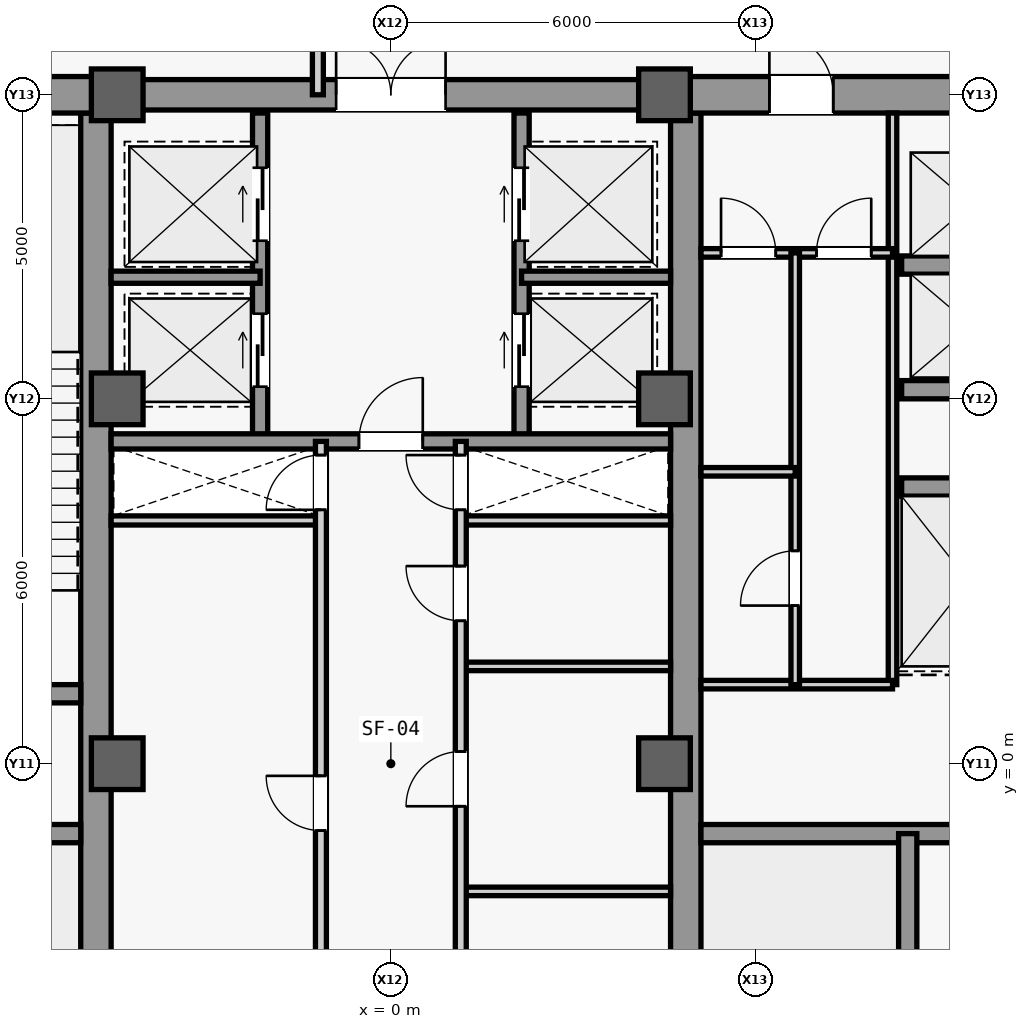
"""IFC4 building model, lengths in metres.
Left out: names, types, materials, properties, quantities, classifications, styles, units other than length and angle.
Written with IfcOpenShell. Run it as: python <this file> out.ifc"""

import sys

from ifc_helpers import new_model, si_unit, direction, frame, frame_2d, origin, origin_2d, place, context, subcontext, project, spatial, rectangle, extrude, source, transform, mapped, element, fill, save


model = new_model("IFC4")
c1 = context("Model", 3, precision=1e-05, world=origin(), true_north=direction((0.0, 1.0)))
c2 = subcontext(c1, "Body", "Model", "MODEL_VIEW")
j1 = project(units=[si_unit("LENGTHUNIT", "METRE"), si_unit("PLANEANGLEUNIT", "RADIAN")], contexts=[c1])
p1 = place(None, origin())
s1 = spatial("IfcSite", under=j1, at=p1, CompositionType="ELEMENT")
p2 = place(p1, origin())
s2 = spatial("IfcBuilding", under=s1, at=p2, CompositionType="ELEMENT")
p3 = place(p2, frame((0.0, 0.0, 263.1)))
s3 = spatial("IfcBuildingStorey", under=s2, at=p3, CompositionType="ELEMENT", Elevation=263.1)
m1 = source(origin(), c2, "Body", "SweptSolid", [
    extrude(rectangle(XDim=21.4, YDim=0.5, at=frame_2d((10.7, 0.0))), origin(), (0.0, 0.0, 1.0), 4.6),
])
for number, where, z_axis, x_axis in (
    (1, (-4.85, -10.7, 0.0), (0.0, 0.0, 1.0), (0.0, 1.0, 0.0)),
    (2, (4.85, -10.7, 0.0), (0.0, 0.0, 1.0), (0.0, 1.0, 0.0)),
):
    element("IfcWall", number, at=place(p3, frame(where, z_axis=z_axis, x_axis=x_axis)), inside=s3, PredefinedType="SHEAR", context=c2, shape_type="MappedRepresentation", body=[
        mapped(m1, transform((0.0, 0.0, 0.0), scale=1.0)),
    ])
m2 = source(origin(), c2, "Body", "SweptSolid", [
    extrude(rectangle(XDim=5.9, YDim=0.6, at=frame_2d((2.95, 0.0))), origin(), (0.0, 0.0, 1.0), 4.6),
])
p4 = place(p3, frame((-10.75, 11.0, 0.0), z_axis=(0.0, 0.0, 1.0), x_axis=(1.0, 0.0, 0.0)))
e3 = element("IfcWall", 3, at=p4, inside=s3, PredefinedType="SHEAR", context=c2, shape_type="MappedRepresentation", body=[
    mapped(m2, transform((0.0, 0.0, 0.0), scale=1.0)),
])
p5 = place(p3, frame((4.85, 11.0, 0.0), z_axis=(0.0, 0.0, 1.0), x_axis=(1.0, 0.0, 0.0)))
e4 = element("IfcWall", 4, at=p5, inside=s3, PredefinedType="SHEAR", context=c2, shape_type="MappedRepresentation", body=[
    mapped(m2, transform((0.0, 0.0, 0.0), scale=1.0)),
])
m3 = source(origin(), c2, "Body", "SweptSolid", [
    extrude(rectangle(XDim=1.05, YDim=2.2, at=frame_2d((0.525, 1.1))), frame((0.0, 0.31, 0.0), z_axis=(0.0, -1.0, 0.0), x_axis=(1.0, 0.0, 0.0)), (0.0, 0.0, 1.0), 0.62),
])
p6 = place(p5, frame((1.375, 0.0, 0.0)))
e5 = element("IfcOpeningElement", 5, at=p6, cuts=e4, PredefinedType="OPENING", context=c2, shape_type="MappedRepresentation", body=[
    mapped(m3, transform((0.0, 0.0, 0.0), scale=1.0)),
])
m4 = source(origin(), c2, "Body", "SweptSolid", [
    extrude(rectangle(XDim=5.65, YDim=0.3, at=frame_2d((2.825, 0.0))), origin(), (0.0, 0.0, 1.0), 4.6),
])
for number, where, z_axis, x_axis in (
    (6, (-10.75, -1.15, 0.0), (0.0, 0.0, 1.0), (1.0, 0.0, 0.0)),
    (7, (-10.75, 1.15, 0.0), (0.0, 0.0, 1.0), (1.0, 0.0, 0.0)),
    (8, (5.1, -1.15, 0.0), (0.0, 0.0, 1.0), (1.0, 0.0, 0.0)),
):
    element("IfcWall", number, at=place(p3, frame(where, z_axis=z_axis, x_axis=x_axis)), inside=s3, PredefinedType="SHEAR", context=c2, shape_type="MappedRepresentation", body=[
        mapped(m4, transform((0.0, 0.0, 0.0), scale=1.0)),
    ])
m5 = source(origin(), c2, "Body", "SweptSolid", [
    extrude(rectangle(XDim=9.2, YDim=0.5, at=frame_2d((4.6, 0.0))), origin(), (0.0, 0.0, 1.0), 4.6),
])
p7 = place(p3, frame((-4.6, 11.0, 0.0), z_axis=(0.0, 0.0, 1.0), x_axis=(1.0, 0.0, 0.0)))
e9 = element("IfcWall", 9, at=p7, inside=s3, PredefinedType="SHEAR", context=c2, shape_type="MappedRepresentation", body=[
    mapped(m5, transform((0.0, 0.0, 0.0), scale=1.0)),
])
m6 = source(origin(), c2, "Body", "SweptSolid", [
    extrude(rectangle(XDim=1.8, YDim=2.25, at=frame_2d((0.9, 1.125))), frame((0.0, 0.26, 0.0), z_axis=(0.0, -1.0, 0.0), x_axis=(1.0, 0.0, 0.0)), (0.0, 0.0, 1.0), 0.52),
])
p8 = place(p7, frame((3.7, 0.0, 0.0)))
e10 = element("IfcOpeningElement", 10, at=p8, cuts=e9, PredefinedType="OPENING", context=c2, shape_type="MappedRepresentation", body=[
    mapped(m6, transform((0.0, 0.0, 0.0), scale=1.0)),
])
m7 = source(origin(), c2, "Body", "SweptSolid", [
    extrude(rectangle(XDim=0.85, YDim=0.85, at=origin_2d()), origin(), (0.0, 0.0, 1.0), 5.2),
])
for number, where, z_axis, x_axis in (
    (11, (-4.5, 0.0, 0.0), (0.0, 0.0, 1.0), (1.0, 0.0, 0.0)),
    (12, (-4.5, 6.0, 0.0), (0.0, 0.0, 1.0), (1.0, 0.0, 0.0)),
    (13, (-4.5, 11.0, 0.0), (0.0, 0.0, 1.0), (1.0, 0.0, 0.0)),
    (14, (4.5, 0.0, 0.0), (0.0, 0.0, 1.0), (1.0, 0.0, 0.0)),
    (15, (4.5, 6.0, 0.0), (0.0, 0.0, 1.0), (1.0, 0.0, 0.0)),
    (16, (4.5, 11.0, 0.0), (0.0, 0.0, 1.0), (1.0, 0.0, 0.0)),
):
    element("IfcColumn", number, at=place(p3, frame(where, z_axis=z_axis, x_axis=x_axis)), inside=s3, PredefinedType="COLUMN", context=c2, shape_type="MappedRepresentation", body=[
        mapped(m7, transform((0.0, 0.0, 0.0), scale=1.0)),
    ])
m8 = source(origin(), c2, "Body", "SweptSolid", [
    extrude(rectangle(XDim=7.8, YDim=0.3, at=frame_2d((3.9, 0.0))), origin(), (0.0, 0.0, 1.0), 4.6),
])
p9 = place(p3, frame((8.5, -8.95, 0.0), z_axis=(0.0, 0.0, 1.0), x_axis=(0.0, 1.0, 0.0)))
e17 = element("IfcWall", 17, at=p9, inside=s3, PredefinedType="SHEAR", context=c2, shape_type="MappedRepresentation", body=[
    mapped(m8, transform((0.0, 0.0, 0.0), scale=1.0)),
])
m9 = source(origin(), c2, "Body", "SweptSolid", [
    extrude(rectangle(XDim=2.3, YDim=0.3, at=frame_2d((1.15, 0.0))), origin(), (0.0, 0.0, 1.0), 4.6),
])
for number, where, z_axis, x_axis in (
    (18, (8.4, 4.55, 0.0), (0.0, 0.0, 1.0), (1.0, 0.0, 0.0)),
    (19, (8.4, 6.15, 0.0), (0.0, 0.0, 1.0), (1.0, 0.0, 0.0)),
    (20, (8.4, 8.2, 0.0), (0.0, 0.0, 1.0), (1.0, 0.0, 0.0)),
):
    element("IfcWall", number, at=place(p3, frame(where, z_axis=z_axis, x_axis=x_axis)), inside=s3, PredefinedType="SHEAR", context=c2, shape_type="MappedRepresentation", body=[
        mapped(m9, transform((0.0, 0.0, 0.0), scale=1.0)),
    ])
m10 = source(origin(), c2, "Body", "SweptSolid", [
    extrude(rectangle(XDim=9.4, YDim=0.14, at=frame_2d((4.7, 0.0))), origin(), (0.0, 0.0, 1.0), 4.6),
])
p10 = place(p3, frame((8.25, 1.3, 0.0), z_axis=(0.0, 0.0, 1.0), x_axis=(0.0, 1.0, 0.0)))
e21 = element("IfcWall", 21, at=p10, inside=s3, PredefinedType="PARTITIONING", context=c2, shape_type="MappedRepresentation", body=[
    mapped(m10, transform((0.0, 0.0, 0.0), scale=1.0)),
])
m11 = source(origin(), c2, "Body", "SweptSolid", [
    extrude(rectangle(XDim=3.15, YDim=0.14, at=frame_2d((1.575, 0.0))), origin(), (0.0, 0.0, 1.0), 4.6),
])
p11 = place(p3, frame((5.1, 1.3, 0.0), z_axis=(0.0, 0.0, 1.0), x_axis=(1.0, 0.0, 0.0)))
e22 = element("IfcWall", 22, at=p11, inside=s3, PredefinedType="PARTITIONING", context=c2, shape_type="MappedRepresentation", body=[
    mapped(m11, transform((0.0, 0.0, 0.0), scale=1.0)),
])
p12 = place(p3, frame((5.1, 8.4, 0.0), z_axis=(0.0, 0.0, 1.0), x_axis=(1.0, 0.0, 0.0)))
e23 = element("IfcWall", 23, at=p12, inside=s3, PredefinedType="PARTITIONING", context=c2, shape_type="MappedRepresentation", body=[
    mapped(m11, transform((0.0, 0.0, 0.0), scale=1.0)),
])
m12 = source(origin(), c2, "Body", "SweptSolid", [
    extrude(rectangle(XDim=0.9, YDim=2.15, at=frame_2d((0.45, 1.075))), frame((0.0, 0.08, 0.0), z_axis=(0.0, -1.0, 0.0), x_axis=(1.0, 0.0, 0.0)), (0.0, 0.0, 1.0), 0.16),
])
p13 = place(p12, frame((0.33, 0.0, 0.0)))
e24 = element("IfcOpeningElement", 24, at=p13, cuts=e23, PredefinedType="OPENING", context=c2, shape_type="MappedRepresentation", body=[
    mapped(m12, transform((0.0, 0.0, 0.0), scale=1.0)),
])
p14 = place(p12, frame((1.9, 0.0, 0.0)))
e25 = element("IfcOpeningElement", 25, at=p14, cuts=e23, PredefinedType="OPENING", context=c2, shape_type="MappedRepresentation", body=[
    mapped(m12, transform((0.0, 0.0, 0.0), scale=1.0)),
])
m13 = source(origin(), c2, "Body", "SweptSolid", [
    extrude(rectangle(XDim=7.1, YDim=0.14, at=frame_2d((3.55, 0.0))), origin(), (0.0, 0.0, 1.0), 4.6),
])
p15 = place(p3, frame((6.65, 1.3, 0.0), z_axis=(0.0, 0.0, 1.0), x_axis=(0.0, 1.0, 0.0)))
e26 = element("IfcWall", 26, at=p15, inside=s3, PredefinedType="PARTITIONING", context=c2, shape_type="MappedRepresentation", body=[
    mapped(m13, transform((0.0, 0.0, 0.0), scale=1.0)),
])
p16 = place(p15, frame((1.3, 0.0, 0.0)))
e27 = element("IfcOpeningElement", 27, at=p16, cuts=e26, PredefinedType="OPENING", context=c2, shape_type="MappedRepresentation", body=[
    mapped(m12, transform((0.0, 0.0, 0.0), scale=1.0)),
])
m14 = source(origin(), c2, "Body", "SweptSolid", [
    extrude(rectangle(XDim=1.55, YDim=0.14, at=frame_2d((0.775, 0.0))), origin(), (0.0, 0.0, 1.0), 4.6),
])
p17 = place(p3, frame((5.1, 4.8, 0.0), z_axis=(0.0, 0.0, 1.0), x_axis=(1.0, 0.0, 0.0)))
e28 = element("IfcWall", 28, at=p17, inside=s3, PredefinedType="PARTITIONING", context=c2, shape_type="MappedRepresentation", body=[
    mapped(m14, transform((0.0, 0.0, 0.0), scale=1.0)),
])
m15 = source(origin(), c2, "Body", "SweptSolid", [
    extrude(rectangle(XDim=3.45, YDim=0.15, at=frame_2d((1.725, 0.0))), origin(), (0.0, 0.0, 1.0), 4.6),
])
for number, where, z_axis, x_axis in (
    (29, (-4.6, 4.0, 0.0), (0.0, 0.0, 1.0), (1.0, 0.0, 0.0)),
    (30, (1.15, 4.0, 0.0), (0.0, 0.0, 1.0), (1.0, 0.0, 0.0)),
):
    element("IfcWall", number, at=place(p3, frame(where, z_axis=z_axis, x_axis=x_axis)), inside=s3, PredefinedType="PARTITIONING", context=c2, shape_type="MappedRepresentation", body=[
        mapped(m15, transform((0.0, 0.0, 0.0), scale=1.0)),
    ])
m16 = source(origin(), c2, "Body", "SweptSolid", [
    extrude(rectangle(XDim=5.4, YDim=0.25, at=frame_2d((2.7, 0.0))), origin(), (0.0, 0.0, 1.0), 4.6),
])
p18 = place(p3, frame((-2.15, 5.3, 0.0), z_axis=(0.0, 0.0, 1.0), x_axis=(0.0, 1.0, 0.0)))
e31 = element("IfcWall", 31, at=p18, inside=s3, PredefinedType="SHEAR", context=c2, shape_type="MappedRepresentation", body=[
    mapped(m16, transform((0.0, 0.0, 0.0), scale=1.0)),
])
m17 = source(origin(), c2, "Body", "SweptSolid", [
    extrude(rectangle(XDim=1.2, YDim=2.3, at=frame_2d((0.6, 1.15))), frame((0.0, 0.135, 0.0), z_axis=(0.0, -1.0, 0.0), x_axis=(1.0, 0.0, 0.0)), (0.0, 0.0, 1.0), 0.27),
])
p19 = place(p18, frame((3.3, 0.0, 0.0)))
e32 = element("IfcOpeningElement", 32, at=p19, cuts=e31, PredefinedType="OPENING", context=c2, shape_type="MappedRepresentation", body=[
    mapped(m17, transform((0.0, 0.0, 0.0), scale=1.0)),
])
p20 = place(p18, frame((0.9, 0.0, 0.0)))
e33 = element("IfcOpeningElement", 33, at=p20, cuts=e31, PredefinedType="OPENING", context=c2, shape_type="MappedRepresentation", body=[
    mapped(m17, transform((0.0, 0.0, 0.0), scale=1.0)),
])
p21 = place(p3, frame((2.15, 5.3, 0.0), z_axis=(0.0, 0.0, 1.0), x_axis=(0.0, 1.0, 0.0)))
e34 = element("IfcWall", 34, at=p21, inside=s3, PredefinedType="SHEAR", context=c2, shape_type="MappedRepresentation", body=[
    mapped(m16, transform((0.0, 0.0, 0.0), scale=1.0)),
])
p22 = place(p21, frame((3.3, 0.0, 0.0)))
e35 = element("IfcOpeningElement", 35, at=p22, cuts=e34, PredefinedType="OPENING", context=c2, shape_type="MappedRepresentation", body=[
    mapped(m17, transform((0.0, 0.0, 0.0), scale=1.0)),
])
p23 = place(p21, frame((0.9, 0.0, 0.0)))
e36 = element("IfcOpeningElement", 36, at=p23, cuts=e34, PredefinedType="OPENING", context=c2, shape_type="MappedRepresentation", body=[
    mapped(m17, transform((0.0, 0.0, 0.0), scale=1.0)),
])
m18 = source(origin(), c2, "Body", "SweptSolid", [
    extrude(rectangle(XDim=2.45, YDim=0.2, at=frame_2d((1.225, 0.0))), origin(), (0.0, 0.0, 1.0), 4.6),
])
for number, where, z_axis, x_axis in (
    (37, (-4.6, 8.0, 0.0), (0.0, 0.0, 1.0), (1.0, 0.0, 0.0)),
    (38, (2.15, 8.0, 0.0), (0.0, 0.0, 1.0), (1.0, 0.0, 0.0)),
):
    element("IfcWall", number, at=place(p3, frame(where, z_axis=z_axis, x_axis=x_axis)), inside=s3, PredefinedType="SHEAR", context=c2, shape_type="MappedRepresentation", body=[
        mapped(m18, transform((0.0, 0.0, 0.0), scale=1.0)),
    ])
m19 = source(origin(), c2, "Body", "SweptSolid", [
    extrude(rectangle(XDim=9.2, YDim=0.25, at=frame_2d((4.6, 0.0))), origin(), (0.0, 0.0, 1.0), 4.6),
])
p24 = place(p3, frame((-4.6, 5.3, 0.0), z_axis=(0.0, 0.0, 1.0), x_axis=(1.0, 0.0, 0.0)))
e39 = element("IfcWall", 39, at=p24, inside=s3, PredefinedType="SHEAR", context=c2, shape_type="MappedRepresentation", body=[
    mapped(m19, transform((0.0, 0.0, 0.0), scale=1.0)),
])
m20 = source(origin(), c2, "Body", "SweptSolid", [
    extrude(rectangle(XDim=1.05, YDim=2.2, at=frame_2d((0.525, 1.1))), frame((0.0, 0.135, 0.0), z_axis=(0.0, -1.0, 0.0), x_axis=(1.0, 0.0, 0.0)), (0.0, 0.0, 1.0), 0.27),
])
p25 = place(p24, frame((4.075, 0.0, 0.0)))
e40 = element("IfcOpeningElement", 40, at=p25, cuts=e39, PredefinedType="OPENING", context=c2, shape_type="MappedRepresentation", body=[
    mapped(m20, transform((0.0, 0.0, 0.0), scale=1.0)),
])
m21 = source(origin(), c2, "Body", "SweptSolid", [
    extrude(rectangle(XDim=10.6, YDim=0.18, at=frame_2d((5.3, 0.0))), origin(), (0.0, 0.0, 1.0), 4.6),
])
p26 = place(p3, frame((-1.15, -5.3, 0.0), z_axis=(0.0, 0.0, 1.0), x_axis=(0.0, 1.0, 0.0)))
e41 = element("IfcWall", 41, at=p26, inside=s3, PredefinedType="PARTITIONING", context=c2, shape_type="MappedRepresentation", body=[
    mapped(m21, transform((0.0, 0.0, 0.0), scale=1.0)),
])
m22 = source(origin(), c2, "Body", "SweptSolid", [
    extrude(rectangle(XDim=0.9, YDim=2.15, at=frame_2d((0.45, 1.075))), frame((0.0, 0.1, 0.0), z_axis=(0.0, -1.0, 0.0), x_axis=(1.0, 0.0, 0.0)), (0.0, 0.0, 1.0), 0.2),
])
p27 = place(p26, frame((4.2, 0.0, 0.0)))
e42 = element("IfcOpeningElement", 42, at=p27, cuts=e41, PredefinedType="OPENING", context=c2, shape_type="MappedRepresentation", body=[
    mapped(m22, transform((0.0, 0.0, 0.0), scale=1.0)),
])
p28 = place(p26, frame((9.475, 0.0, 0.0)))
e43 = element("IfcOpeningElement", 43, at=p28, cuts=e41, PredefinedType="OPENING", context=c2, shape_type="MappedRepresentation", body=[
    mapped(m22, transform((0.0, 0.0, 0.0), scale=1.0)),
])
m23 = source(origin(), c2, "Body", "SweptSolid", [
    extrude(rectangle(XDim=3.45, YDim=0.14, at=frame_2d((1.725, 0.0))), origin(), (0.0, 0.0, 1.0), 4.6),
])
for number, where, z_axis, x_axis in (
    (44, (1.15, -2.1, 0.0), (0.0, 0.0, 1.0), (1.0, 0.0, 0.0)),
    (45, (1.15, 1.6, 0.0), (0.0, 0.0, 1.0), (1.0, 0.0, 0.0)),
):
    element("IfcWall", number, at=place(p3, frame(where, z_axis=z_axis, x_axis=x_axis)), inside=s3, PredefinedType="PARTITIONING", context=c2, shape_type="MappedRepresentation", body=[
        mapped(m23, transform((0.0, 0.0, 0.0), scale=1.0)),
    ])
p29 = place(p3, frame((1.15, -5.3, 0.0), z_axis=(0.0, 0.0, 1.0), x_axis=(0.0, 1.0, 0.0)))
e46 = element("IfcWall", 46, at=p29, inside=s3, PredefinedType="PARTITIONING", context=c2, shape_type="MappedRepresentation", body=[
    mapped(m21, transform((0.0, 0.0, 0.0), scale=1.0)),
])
p30 = place(p29, frame((1.15, 0.0, 0.0)))
e47 = element("IfcOpeningElement", 47, at=p30, cuts=e46, PredefinedType="OPENING", context=c2, shape_type="MappedRepresentation", body=[
    mapped(m22, transform((0.0, 0.0, 0.0), scale=1.0)),
])
p31 = place(p29, frame((4.6, 0.0, 0.0)))
e48 = element("IfcOpeningElement", 48, at=p31, cuts=e46, PredefinedType="OPENING", context=c2, shape_type="MappedRepresentation", body=[
    mapped(m22, transform((0.0, 0.0, 0.0), scale=1.0)),
])
p32 = place(p29, frame((7.65, 0.0, 0.0)))
e49 = element("IfcOpeningElement", 49, at=p32, cuts=e46, PredefinedType="OPENING", context=c2, shape_type="MappedRepresentation", body=[
    mapped(m22, transform((0.0, 0.0, 0.0), scale=1.0)),
])
p33 = place(p29, frame((9.475, 0.0, 0.0)))
e50 = element("IfcOpeningElement", 50, at=p33, cuts=e46, PredefinedType="OPENING", context=c2, shape_type="MappedRepresentation", body=[
    mapped(m22, transform((0.0, 0.0, 0.0), scale=1.0)),
])
m24 = source(origin(), c2, "Body", "SweptSolid", [
    extrude(rectangle(XDim=3.1, YDim=0.18, at=frame_2d((1.55, 0.0))), origin(), (0.0, 0.0, 1.0), 4.6),
])
p34 = place(p3, frame((-1.2, 11.0, 0.0), z_axis=(0.0, 0.0, 1.0), x_axis=(0.0, 1.0, 0.0)))
e51 = element("IfcWall", 51, at=p34, inside=s3, PredefinedType="PARTITIONING", context=c2, shape_type="MappedRepresentation", body=[
    mapped(m24, transform((0.0, 0.0, 0.0), scale=1.0)),
])
m25 = source(origin(), c2, "Body", "SweptSolid", [
    extrude(rectangle(XDim=1.05, YDim=2.2, at=frame_2d((0.525, 1.1))), frame((0.0, 0.025, 0.0), z_axis=(0.0, -1.0, 0.0), x_axis=(1.0, 0.0, 0.0)), (0.0, 0.0, 1.0), 0.05),
])
p35 = place(p6, origin())
e52 = element("IfcDoor", 52, at=p35, inside=s3, OperationType="SINGLE_SWING_LEFT", PredefinedType="DOOR", context=c2, shape_type="MappedRepresentation", body=[
    mapped(m25, transform((0.0, 0.0, 0.0), scale=1.0)),
])
fill(e5, e52)
m26 = source(origin(), c2, "Body", "SweptSolid", [
    extrude(rectangle(XDim=0.9, YDim=2.15, at=frame_2d((0.45, 1.075))), frame((0.0, 0.025, 0.0), z_axis=(0.0, -1.0, 0.0), x_axis=(1.0, 0.0, 0.0)), (0.0, 0.0, 1.0), 0.05),
])
p36 = place(p13, origin())
e53 = element("IfcDoor", 53, at=p36, inside=s3, OperationType="SINGLE_SWING_LEFT", PredefinedType="DOOR", context=c2, shape_type="MappedRepresentation", body=[
    mapped(m26, transform((0.0, 0.0, 0.0), scale=1.0)),
])
fill(e24, e53)
p37 = place(p14, origin())
e54 = element("IfcDoor", 54, at=p37, inside=s3, OperationType="SINGLE_SWING_RIGHT", PredefinedType="DOOR", context=c2, shape_type="MappedRepresentation", body=[
    mapped(m26, transform((0.0, 0.0, 0.0), scale=1.0)),
])
fill(e25, e54)
p38 = place(p16, origin())
e55 = element("IfcDoor", 55, at=p38, inside=s3, OperationType="SINGLE_SWING_LEFT", PredefinedType="DOOR", context=c2, shape_type="MappedRepresentation", body=[
    mapped(m26, transform((0.0, 0.0, 0.0), scale=1.0)),
])
fill(e27, e55)
p39 = place(p25, origin())
e56 = element("IfcDoor", 56, at=p39, inside=s3, OperationType="SINGLE_SWING_RIGHT", PredefinedType="DOOR", context=c2, shape_type="MappedRepresentation", body=[
    mapped(m25, transform((0.0, 0.0, 0.0), scale=1.0)),
])
fill(e40, e56)
m27 = source(origin(), c2, "Body", "SweptSolid", [
    extrude(rectangle(XDim=1.8, YDim=2.25, at=frame_2d((0.9, 1.125))), frame((0.0, 0.025, 0.0), z_axis=(0.0, -1.0, 0.0), x_axis=(1.0, 0.0, 0.0)), (0.0, 0.0, 1.0), 0.05),
])
p40 = place(p8, origin())
e57 = element("IfcDoor", 57, at=p40, inside=s3, OperationType="SINGLE_SWING_RIGHT", PredefinedType="DOOR", context=c2, shape_type="MappedRepresentation", body=[
    mapped(m27, transform((0.0, 0.0, 0.0), scale=1.0)),
])
fill(e10, e57)
p41 = place(p27, origin())
e58 = element("IfcDoor", 58, at=p41, inside=s3, OperationType="SINGLE_SWING_RIGHT", PredefinedType="DOOR", context=c2, shape_type="MappedRepresentation", body=[
    mapped(m26, transform((0.0, 0.0, 0.0), scale=1.0)),
])
fill(e42, e58)
p42 = place(p31, origin())
e59 = element("IfcDoor", 59, at=p42, inside=s3, OperationType="SINGLE_SWING_LEFT", PredefinedType="DOOR", context=c2, shape_type="MappedRepresentation", body=[
    mapped(m26, transform((0.0, 0.0, 0.0), scale=1.0)),
])
fill(e48, e59)
p43 = place(p32, origin())
e60 = element("IfcDoor", 60, at=p43, inside=s3, OperationType="SINGLE_SWING_RIGHT", PredefinedType="DOOR", context=c2, shape_type="MappedRepresentation", body=[
    mapped(m26, transform((0.0, 0.0, 0.0), scale=1.0)),
])
fill(e49, e60)
p44 = place(p28, origin())
e61 = element("IfcDoor", 61, at=p44, inside=s3, OperationType="SINGLE_SWING_LEFT", PredefinedType="DOOR", context=c2, shape_type="MappedRepresentation", body=[
    mapped(m26, transform((0.0, 0.0, 0.0), scale=1.0)),
])
fill(e43, e61)
p45 = place(p33, origin())
e62 = element("IfcDoor", 62, at=p45, inside=s3, OperationType="SINGLE_SWING_RIGHT", PredefinedType="DOOR", context=c2, shape_type="MappedRepresentation", body=[
    mapped(m26, transform((0.0, 0.0, 0.0), scale=1.0)),
])
fill(e50, e62)
m28 = source(origin(), c2, "Body", "SweptSolid", [
    extrude(rectangle(XDim=1.2, YDim=2.3, at=frame_2d((0.6, 1.15))), frame((0.0, 0.025, 0.0), z_axis=(0.0, -1.0, 0.0), x_axis=(1.0, 0.0, 0.0)), (0.0, 0.0, 1.0), 0.05),
])
p46 = place(p19, origin())
e63 = element("IfcDoor", 63, at=p46, inside=s3, OperationType="SLIDING_TO_LEFT", PredefinedType="DOOR", context=c2, shape_type="MappedRepresentation", body=[
    mapped(m28, transform((0.0, 0.0, 0.0), scale=1.0)),
])
fill(e32, e63)
p47 = place(p22, origin())
e64 = element("IfcDoor", 64, at=p47, inside=s3, OperationType="SLIDING_TO_LEFT", PredefinedType="DOOR", context=c2, shape_type="MappedRepresentation", body=[
    mapped(m28, transform((0.0, 0.0, 0.0), scale=1.0)),
])
fill(e35, e64)
p48 = place(p20, origin())
e65 = element("IfcDoor", 65, at=p48, inside=s3, OperationType="SLIDING_TO_LEFT", PredefinedType="DOOR", context=c2, shape_type="MappedRepresentation", body=[
    mapped(m28, transform((0.0, 0.0, 0.0), scale=1.0)),
])
fill(e33, e65)
p49 = place(p23, origin())
e66 = element("IfcDoor", 66, at=p49, inside=s3, OperationType="SLIDING_TO_LEFT", PredefinedType="DOOR", context=c2, shape_type="MappedRepresentation", body=[
    mapped(m28, transform((0.0, 0.0, 0.0), scale=1.0)),
])
fill(e36, e66)
save(model, sys.argv[1])
